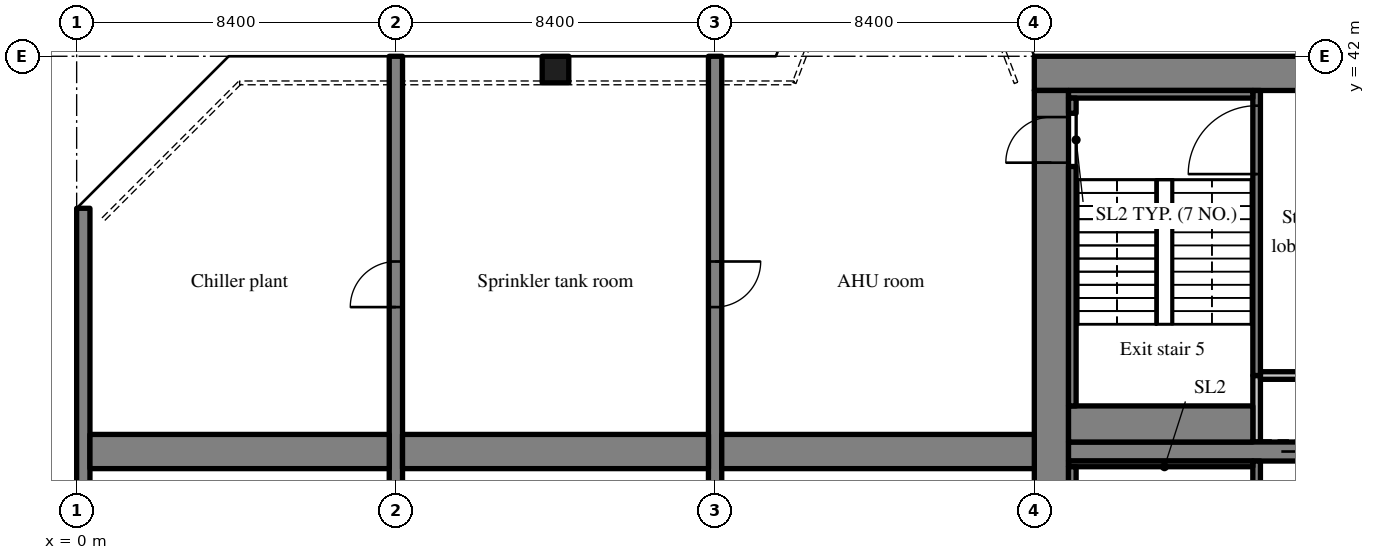
"""IFC4 building model, lengths in metres.
Left out: names, types, materials, properties, quantities, classifications, styles, units other than length and angle.
Written with IfcOpenShell. Run it as: python <this file> out.ifc"""

import sys

from ifc_helpers import new_model, si_unit, direction, frame, frame_2d, origin, origin_2d, place, context, subcontext, project, spatial, rectangle, extrude, source, transform, mapped, element, fill, save


model = new_model("IFC4")
c1 = context("Model", 3, precision=1e-05, world=origin(), true_north=direction((0.0, 1.0)))
c2 = subcontext(c1, "Body", "Model", "MODEL_VIEW")
j1 = project(units=[si_unit("LENGTHUNIT", "METRE"), si_unit("PLANEANGLEUNIT", "RADIAN")], contexts=[c1])
p1 = place(None, origin())
s1 = spatial("IfcSite", under=j1, at=p1, CompositionType="ELEMENT")
p2 = place(p1, origin())
s2 = spatial("IfcBuilding", under=s1, at=p2, CompositionType="ELEMENT")
p3 = place(p2, frame((0.0, 0.0, 140.8)))
s3 = spatial("IfcBuildingStorey", under=s2, at=p3, CompositionType="ELEMENT", Elevation=140.8)
m1 = source(origin(), c2, "Body", "SweptSolid", [
    extrude(rectangle(XDim=50.4, YDim=0.9, at=frame_2d((25.2, 0.0))), origin(), (0.0, 0.0, 1.0), 5.12),
])
p4 = place(p3, frame((25.2, 41.55, 0.0), z_axis=(0.0, 0.0, 1.0), x_axis=(1.0, 0.0, 0.0)))
e1 = element("IfcWall", 1, at=p4, inside=s3, PredefinedType="SHEAR", context=c2, shape_type="MappedRepresentation", body=[
    mapped(m1, transform((0.0, 0.0, 0.0), scale=1.0)),
])
m2 = source(origin(), c2, "Body", "SweptSolid", [
    extrude(rectangle(XDim=18.2, YDim=0.9, at=frame_2d((9.1, 0.0))), origin(), (0.0, 0.0, 1.0), 5.12),
])
p5 = place(p3, frame((25.65, 22.9, 0.0), z_axis=(0.0, 0.0, 1.0), x_axis=(0.0, 1.0, 0.0)))
e2 = element("IfcWall", 2, at=p5, inside=s3, PredefinedType="SHEAR", context=c2, shape_type="MappedRepresentation", body=[
    mapped(m2, transform((0.0, 0.0, 0.0), scale=1.0)),
])
m3 = source(origin(), c2, "Body", "SweptSolid", [
    extrude(rectangle(XDim=1.2, YDim=2.1, at=frame_2d((0.6, 1.05))), frame((0.0, 0.46, 0.0), z_axis=(0.0, -1.0, 0.0), x_axis=(1.0, 0.0, 0.0)), (0.0, 0.0, 1.0), 0.92),
])
p6 = place(p5, frame((16.3, 0.0, 0.0)))
e3 = element("IfcOpeningElement", 3, at=p6, cuts=e2, PredefinedType="OPENING", context=c2, shape_type="MappedRepresentation", body=[
    mapped(m3, transform((0.0, 0.0, 0.0), scale=1.0)),
])
m4 = source(origin(), c2, "Body", "SweptSolid", [
    extrude(rectangle(XDim=7.25, YDim=0.5, at=frame_2d((3.625, 0.0))), origin(), (0.0, 0.0, 1.0), 5.12),
])
p7 = place(p3, frame((26.1, 31.6, 0.0), z_axis=(0.0, 0.0, 1.0), x_axis=(1.0, 0.0, 0.0)))
e4 = element("IfcWall", 4, at=p7, inside=s3, PredefinedType="SHEAR", context=c2, shape_type="MappedRepresentation", body=[
    mapped(m4, transform((0.0, 0.0, 0.0), scale=1.0)),
])
m5 = source(origin(), c2, "Body", "SweptSolid", [
    extrude(rectangle(XDim=1.1, YDim=2.1, at=frame_2d((0.55, 1.05))), frame((0.0, 0.26, 0.0), z_axis=(0.0, -1.0, 0.0), x_axis=(1.0, 0.0, 0.0)), (0.0, 0.0, 1.0), 0.52),
])
p8 = place(p7, frame((5.6, 0.0, 0.0)))
e5 = element("IfcOpeningElement", 5, at=p8, cuts=e4, PredefinedType="OPENING", context=c2, shape_type="MappedRepresentation", body=[
    mapped(m5, transform((0.0, 0.0, 0.0), scale=1.0)),
])
m6 = source(origin(), c2, "Body", "SweptSolid", [
    extrude(rectangle(XDim=16.0, YDim=0.35, at=frame_2d((8.0, 0.0))), origin(), (0.0, 0.0, 1.0), 5.12),
])
p9 = place(p3, frame((0.175, 22.0, 0.0), z_axis=(0.0, 0.0, 1.0), x_axis=(0.0, 1.0, 0.0)))
e6 = element("IfcWall", 6, at=p9, inside=s3, PredefinedType="SHEAR", context=c2, shape_type="MappedRepresentation", body=[
    mapped(m6, transform((0.0, 0.0, 0.0), scale=1.0)),
])
m7 = source(origin(), c2, "Body", "SweptSolid", [
    extrude(rectangle(XDim=20.0, YDim=0.35, at=frame_2d((10.0, 0.0))), origin(), (0.0, 0.0, 1.0), 5.12),
])
p10 = place(p3, frame((8.4, 22.0, 0.0), z_axis=(0.0, 0.0, 1.0), x_axis=(0.0, 1.0, 0.0)))
e7 = element("IfcWall", 7, at=p10, inside=s3, PredefinedType="SHEAR", context=c2, shape_type="MappedRepresentation", body=[
    mapped(m7, transform((0.0, 0.0, 0.0), scale=1.0)),
])
m8 = source(origin(), c2, "Body", "SweptSolid", [
    extrude(rectangle(XDim=1.2, YDim=2.1, at=frame_2d((0.6, 1.05))), frame((0.0, 0.185, 0.0), z_axis=(0.0, -1.0, 0.0), x_axis=(1.0, 0.0, 0.0)), (0.0, 0.0, 1.0), 0.37),
])
p11 = place(p10, frame((13.4, 0.0, 0.0)))
e8 = element("IfcOpeningElement", 8, at=p11, cuts=e7, PredefinedType="OPENING", context=c2, shape_type="MappedRepresentation", body=[
    mapped(m8, transform((0.0, 0.0, 0.0), scale=1.0)),
])
p12 = place(p3, frame((16.8, 22.0, 0.0), z_axis=(0.0, 0.0, 1.0), x_axis=(0.0, 1.0, 0.0)))
e9 = element("IfcWall", 9, at=p12, inside=s3, PredefinedType="SHEAR", context=c2, shape_type="MappedRepresentation", body=[
    mapped(m7, transform((0.0, 0.0, 0.0), scale=1.0)),
])
p13 = place(p12, frame((13.4, 0.0, 0.0)))
e10 = element("IfcOpeningElement", 10, at=p13, cuts=e9, PredefinedType="OPENING", context=c2, shape_type="MappedRepresentation", body=[
    mapped(m8, transform((0.0, 0.0, 0.0), scale=1.0)),
])
m9 = source(origin(), c2, "Body", "SweptSolid", [
    extrude(rectangle(XDim=0.7, YDim=0.7, at=origin_2d()), origin(), (0.0, 0.0, 1.0), 5.12),
])
p14 = place(p3, frame((12.6, 41.65, 0.0), z_axis=(0.0, 0.0, 1.0), x_axis=(1.0, 0.0, 0.0)))
e11 = element("IfcColumn", 11, at=p14, inside=s3, PredefinedType="COLUMN", context=c2, shape_type="MappedRepresentation", body=[
    mapped(m9, transform((0.0, 0.0, 0.0), scale=1.0)),
])
m10 = source(origin(), c2, "Body", "SweptSolid", [
    extrude(rectangle(XDim=7.875, YDim=0.9, at=frame_2d((3.938, 0.0))), origin(), (0.0, 0.0, 1.0), 5.12),
])
p15 = place(p3, frame((0.35, 31.6, 0.0), z_axis=(0.0, 0.0, 1.0), x_axis=(1.0, 0.0, 0.0)))
e12 = element("IfcWall", 12, at=p15, inside=s3, PredefinedType="SHEAR", context=c2, shape_type="MappedRepresentation", body=[
    mapped(m10, transform((0.0, 0.0, 0.0), scale=1.0)),
])
m11 = source(origin(), c2, "Body", "SweptSolid", [
    extrude(rectangle(XDim=8.05, YDim=0.9, at=frame_2d((4.025, 0.0))), origin(), (0.0, 0.0, 1.0), 5.12),
])
p16 = place(p3, frame((8.575, 31.6, 0.0), z_axis=(0.0, 0.0, 1.0), x_axis=(1.0, 0.0, 0.0)))
e13 = element("IfcWall", 13, at=p16, inside=s3, PredefinedType="SHEAR", context=c2, shape_type="MappedRepresentation", body=[
    mapped(m11, transform((0.0, 0.0, 0.0), scale=1.0)),
])
m12 = source(origin(), c2, "Body", "SweptSolid", [
    extrude(rectangle(XDim=8.225, YDim=0.9, at=frame_2d((4.112, 0.0))), origin(), (0.0, 0.0, 1.0), 5.12),
])
p17 = place(p3, frame((16.975, 31.6, 0.0), z_axis=(0.0, 0.0, 1.0), x_axis=(1.0, 0.0, 0.0)))
e14 = element("IfcWall", 14, at=p17, inside=s3, PredefinedType="SHEAR", context=c2, shape_type="MappedRepresentation", body=[
    mapped(m12, transform((0.0, 0.0, 0.0), scale=1.0)),
])
m13 = source(origin(), c2, "Body", "SweptSolid", [
    extrude(rectangle(XDim=8.45, YDim=0.2, at=frame_2d((4.225, 0.0))), origin(), (0.0, 0.0, 1.0), 5.12),
])
p18 = place(p3, frame((31.05, 22.9, 0.0), z_axis=(0.0, 0.0, 1.0), x_axis=(0.0, 1.0, 0.0)))
e15 = element("IfcWall", 15, at=p18, inside=s3, PredefinedType="SOLIDWALL", context=c2, shape_type="MappedRepresentation", body=[
    mapped(m13, transform((0.0, 0.0, 0.0), scale=1.0)),
])
m14 = source(origin(), c2, "Body", "SweptSolid", [
    extrude(rectangle(XDim=1.2, YDim=2.1, at=frame_2d((0.6, 1.05))), frame((0.0, 0.11, 0.0), z_axis=(0.0, -1.0, 0.0), x_axis=(1.0, 0.0, 0.0)), (0.0, 0.0, 1.0), 0.22),
])
p19 = place(p18, frame((6.6, 0.0, 0.0)))
e16 = element("IfcOpeningElement", 16, at=p19, cuts=e15, PredefinedType="OPENING", context=c2, shape_type="MappedRepresentation", body=[
    mapped(m14, transform((0.0, 0.0, 0.0), scale=1.0)),
])
m15 = source(origin(), c2, "Body", "SweptSolid", [
    extrude(rectangle(XDim=1.75, YDim=0.2, at=frame_2d((0.875, 0.0))), origin(), (0.0, 0.0, 1.0), 5.12),
])
p20 = place(p3, frame((31.05, 31.85, 0.0), z_axis=(0.0, 0.0, 1.0), x_axis=(0.0, 1.0, 0.0)))
e17 = element("IfcWall", 17, at=p20, inside=s3, PredefinedType="SOLIDWALL", context=c2, shape_type="MappedRepresentation", body=[
    mapped(m15, transform((0.0, 0.0, 0.0), scale=1.0)),
])
m16 = source(origin(), c2, "Body", "SweptSolid", [
    extrude(rectangle(XDim=2.2, YDim=0.2, at=frame_2d((1.1, 0.0))), origin(), (0.0, 0.0, 1.0), 5.12),
])
p21 = place(p3, frame((31.15, 33.6, 0.0), z_axis=(0.0, 0.0, 1.0), x_axis=(1.0, 0.0, 0.0)))
e18 = element("IfcWall", 18, at=p21, inside=s3, PredefinedType="SOLIDWALL", context=c2, shape_type="MappedRepresentation", body=[
    mapped(m16, transform((0.0, 0.0, 0.0), scale=1.0)),
])
m17 = source(origin(), c2, "Body", "SweptSolid", [
    extrude(rectangle(XDim=7.5, YDim=0.2, at=frame_2d((3.75, 0.0))), origin(), (0.0, 0.0, 1.0), 5.12),
])
p22 = place(p3, frame((31.05, 33.6, 0.0), z_axis=(0.0, 0.0, 1.0), x_axis=(0.0, 1.0, 0.0)))
e19 = element("IfcWall", 19, at=p22, inside=s3, PredefinedType="SOLIDWALL", context=c2, shape_type="MappedRepresentation", body=[
    mapped(m17, transform((0.0, 0.0, 0.0), scale=1.0)),
])
m18 = source(origin(), c2, "Body", "SweptSolid", [
    extrude(rectangle(XDim=1.8, YDim=2.1, at=frame_2d((0.9, 1.05))), frame((0.0, 0.11, 0.0), z_axis=(0.0, -1.0, 0.0), x_axis=(1.0, 0.0, 0.0)), (0.0, 0.0, 1.0), 0.22),
])
p23 = place(p22, frame((5.3, 0.0, 0.0)))
e20 = element("IfcOpeningElement", 20, at=p23, cuts=e19, PredefinedType="OPENING", context=c2, shape_type="MappedRepresentation", body=[
    mapped(m18, transform((0.0, 0.0, 0.0), scale=1.0)),
])
m19 = source(origin(), c2, "Body", "SweptSolid", [
    extrude(rectangle(XDim=4.85, YDim=0.15, at=frame_2d((2.425, 0.0))), origin(), (0.0, 0.0, 1.0), 5.12),
])
p24 = place(p3, frame((26.1, 31.275, 0.0), z_axis=(0.0, 0.0, 1.0), x_axis=(1.0, 0.0, 0.0)))
e21 = element("IfcWall", 21, at=p24, inside=s3, PredefinedType="SOLIDWALL", context=c2, shape_type="MappedRepresentation", body=[
    mapped(m19, transform((0.0, 0.0, 0.0), scale=1.0)),
])
m20 = source(origin(), c2, "Body", "SweptSolid", [
    extrude(rectangle(XDim=8.1, YDim=0.2, at=frame_2d((4.05, 0.0))), origin(), (0.0, 0.0, 1.0), 5.12),
])
p25 = place(p3, frame((26.2, 23.1, 0.0), z_axis=(0.0, 0.0, 1.0), x_axis=(0.0, 1.0, 0.0)))
e22 = element("IfcWall", 22, at=p25, inside=s3, PredefinedType="SOLIDWALL", context=c2, shape_type="MappedRepresentation", body=[
    mapped(m20, transform((0.0, 0.0, 0.0), scale=1.0)),
])
m21 = source(origin(), c2, "Body", "SweptSolid", [
    extrude(rectangle(XDim=4.85, YDim=0.2, at=frame_2d((2.425, 0.0))), origin(), (0.0, 0.0, 1.0), 5.12),
])
p26 = place(p3, frame((26.1, 41.0, 0.0), z_axis=(0.0, 0.0, 1.0), x_axis=(1.0, 0.0, 0.0)))
e23 = element("IfcWall", 23, at=p26, inside=s3, PredefinedType="SOLIDWALL", context=c2, shape_type="MappedRepresentation", body=[
    mapped(m21, transform((0.0, 0.0, 0.0), scale=1.0)),
])
m22 = source(origin(), c2, "Body", "SweptSolid", [
    extrude(rectangle(XDim=4.85, YDim=0.95, at=frame_2d((2.425, 0.0))), origin(), (0.0, 0.0, 1.0), 5.12),
])
p27 = place(p3, frame((26.1, 32.325, 0.0), z_axis=(0.0, 0.0, 1.0), x_axis=(1.0, 0.0, 0.0)))
e24 = element("IfcWall", 24, at=p27, inside=s3, PredefinedType="SOLIDWALL", context=c2, shape_type="MappedRepresentation", body=[
    mapped(m22, transform((0.0, 0.0, 0.0), scale=1.0)),
])
m23 = source(origin(), c2, "Body", "SweptSolid", [
    extrude(rectangle(XDim=6.3, YDim=0.2, at=frame_2d((3.15, 0.0))), origin(), (0.0, 0.0, 1.0), 5.12),
])
p28 = place(p3, frame((26.2, 32.8, 0.0), z_axis=(0.0, 0.0, 1.0), x_axis=(0.0, 1.0, 0.0)))
e25 = element("IfcWall", 25, at=p28, inside=s3, PredefinedType="SOLIDWALL", context=c2, shape_type="MappedRepresentation", body=[
    mapped(m23, transform((0.0, 0.0, 0.0), scale=1.0)),
])
m24 = source(origin(), c2, "Body", "SweptSolid", [
    extrude(rectangle(XDim=0.4, YDim=0.2, at=frame_2d((0.2, 0.0))), origin(), (0.0, 0.0, 1.0), 5.12),
])
p29 = place(p3, frame((26.2, 40.5, 0.0), z_axis=(0.0, 0.0, 1.0), x_axis=(0.0, 1.0, 0.0)))
e26 = element("IfcWall", 26, at=p29, inside=s3, PredefinedType="SOLIDWALL", context=c2, shape_type="MappedRepresentation", body=[
    mapped(m24, transform((0.0, 0.0, 0.0), scale=1.0)),
])
m25 = source(origin(), c2, "Body", "SweptSolid", [
    extrude(rectangle(XDim=1.1, YDim=2.1, at=frame_2d((0.55, 1.05))), frame((0.0, 0.025, 0.0), z_axis=(0.0, -1.0, 0.0), x_axis=(1.0, 0.0, 0.0)), (0.0, 0.0, 1.0), 0.05),
])
p30 = place(p8, origin())
e27 = element("IfcDoor", 27, at=p30, inside=s3, OperationType="SLIDING_TO_RIGHT", PredefinedType="DOOR", context=c2, shape_type="MappedRepresentation", body=[
    mapped(m25, transform((0.0, 0.0, 0.0), scale=1.0)),
])
fill(e5, e27)
m26 = source(origin(), c2, "Body", "SweptSolid", [
    extrude(rectangle(XDim=1.8, YDim=2.1, at=frame_2d((0.9, 1.05))), frame((0.0, 0.025, 0.0), z_axis=(0.0, -1.0, 0.0), x_axis=(1.0, 0.0, 0.0)), (0.0, 0.0, 1.0), 0.05),
])
p31 = place(p23, origin())
e28 = element("IfcDoor", 28, at=p31, inside=s3, OperationType="SINGLE_SWING_LEFT", PredefinedType="DOOR", context=c2, shape_type="MappedRepresentation", body=[
    mapped(m26, transform((0.0, 0.0, 0.0), scale=1.0)),
])
fill(e20, e28)
m27 = source(origin(), c2, "Body", "SweptSolid", [
    extrude(rectangle(XDim=1.2, YDim=2.1, at=frame_2d((0.6, 1.05))), frame((0.0, 0.025, 0.0), z_axis=(0.0, -1.0, 0.0), x_axis=(1.0, 0.0, 0.0)), (0.0, 0.0, 1.0), 0.05),
])
p32 = place(p6, origin())
e29 = element("IfcDoor", 29, at=p32, inside=s3, OperationType="SINGLE_SWING_LEFT", PredefinedType="DOOR", context=c2, shape_type="MappedRepresentation", body=[
    mapped(m27, transform((0.0, 0.0, 0.0), scale=1.0)),
])
fill(e3, e29)
p33 = place(p11, origin())
e30 = element("IfcDoor", 30, at=p33, inside=s3, OperationType="SINGLE_SWING_LEFT", PredefinedType="DOOR", context=c2, shape_type="MappedRepresentation", body=[
    mapped(m27, transform((0.0, 0.0, 0.0), scale=1.0)),
])
fill(e8, e30)
p34 = place(p13, origin())
e31 = element("IfcDoor", 31, at=p34, inside=s3, OperationType="SINGLE_SWING_RIGHT", PredefinedType="DOOR", context=c2, shape_type="MappedRepresentation", body=[
    mapped(m27, transform((0.0, 0.0, 0.0), scale=1.0)),
])
fill(e10, e31)
save(model, sys.argv[1])
